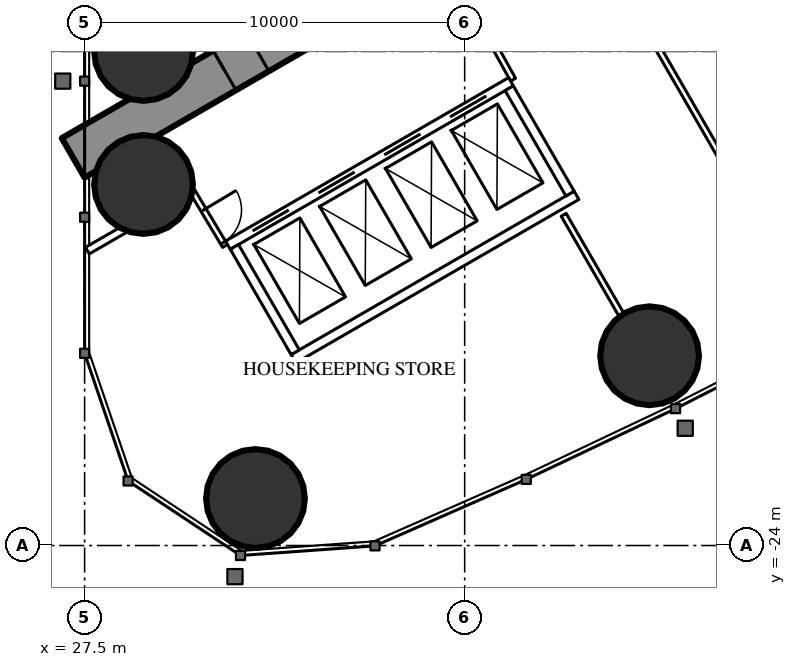
"""IFC4 building model, lengths in metres.
Left out: names, types, materials, properties, quantities, classifications, styles, units other than length and angle.
Written with IfcOpenShell. Run it as: python <this file> out.ifc"""

import sys

from ifc_helpers import new_model, si_unit, direction, frame, frame_2d, origin, origin_2d, place, context, subcontext, project, spatial, rectangle, hollow_circle, extrude, element, fill, save


model = new_model("IFC4")
c1 = context("Model", 3, precision=1e-05, world=origin(), true_north=direction((0.0, 1.0)))
c2 = subcontext(c1, "Body", "Model", "MODEL_VIEW")
j1 = project(units=[si_unit("LENGTHUNIT", "METRE"), si_unit("PLANEANGLEUNIT", "RADIAN")], contexts=[c1])
p1 = place(None, origin())
s1 = spatial("IfcSite", under=j1, at=p1, CompositionType="ELEMENT")
p2 = place(p1, origin())
s2 = spatial("IfcBuilding", under=s1, at=p2, CompositionType="ELEMENT")
p3 = place(p2, frame((0.0, 0.0, 115.1)))
s3 = spatial("IfcBuildingStorey", under=s2, at=p3, CompositionType="ELEMENT", Elevation=115.1)
for number, where, z_axis, x_axis in (
    (1, (31.996, -22.763, 0.0), (0.0, 0.0, 1.0), (1.0, 0.0, 0.0)),
    (2, (29.05, -11.0, 0.0), (0.0, 0.0, 1.0), (1.0, 0.0, 0.0)),
    (3, (29.05, -14.5, 0.0), (0.0, 0.0, 1.0), (1.0, 0.0, 0.0)),
    (4, (42.366, -19.007, 0.0), (0.0, 0.0, 1.0), (1.0, 0.0, 0.0)),
):
    element("IfcColumn", number, at=place(p3, frame(where, z_axis=z_axis, x_axis=x_axis)), inside=s3, PredefinedType="COLUMN", context=c2, shape_type="SweptSolid", body=[
        extrude(hollow_circle(Radius=1.3, WallThickness=0.1, at=origin_2d()), origin(), (0.0, 0.0, 1.0), 3.5),
    ])
p4 = place(p3, frame((27.2, -13.8, 0.0), z_axis=(0.0, 0.0, 1.0), x_axis=(0.866027159892, 0.499996958321, 0.0)))
e5 = element("IfcWall", 5, at=p4, inside=s3, PredefinedType="SHEAR", context=c2, shape_type="SweptSolid", body=[
    extrude(rectangle(XDim=27.947, YDim=1.2, at=frame_2d((13.973, 0.0))), origin(), (0.0, 0.0, 1.0), 3.5),
])
p5 = place(p4, frame((4.6, 0.0, 0.0)))
e6 = element("IfcOpeningElement", 6, at=p5, cuts=e5, PredefinedType="OPENING", context=c2, shape_type="SweptSolid", body=[
    extrude(rectangle(XDim=1.0, YDim=2.2, at=frame_2d((0.5, 1.1))), frame((0.0, 0.61, 0.0), z_axis=(0.0, -1.0, 0.0), x_axis=(1.0, 0.0, 0.0)), (0.0, 0.0, 1.0), 1.22),
])
p6 = place(p4, frame((13.395, 0.0, 0.0)))
e7 = element("IfcOpeningElement", 7, at=p6, cuts=e5, PredefinedType="OPENING", context=c2, shape_type="SweptSolid", body=[
    extrude(rectangle(XDim=1.8, YDim=2.2, at=frame_2d((0.9, 1.1))), frame((0.0, 0.61, 0.0), z_axis=(0.0, -1.0, 0.0), x_axis=(1.0, 0.0, 0.0)), (0.0, 0.0, 1.0), 1.22),
])
p7 = place(p3, frame((41.19, -8.494, 0.0), z_axis=(0.0, 0.0, 1.0), x_axis=(0.49999258054, -0.866029687369, 0.0)))
e8 = element("IfcWall", 8, at=p7, inside=s3, PredefinedType="PARTITIONING", context=c2, shape_type="SweptSolid", body=[
    extrude(rectangle(XDim=11.318, YDim=0.15, at=frame_2d((5.659, 0.0))), origin(), (0.0, 0.0, 1.0), 3.25),
])
p8 = place(p3, frame((40.105, -15.299, 0.0), z_axis=(0.0, 0.0, 1.0), x_axis=(0.499978822259, -0.866037630414, 0.0)))
e9 = element("IfcWall", 9, at=p8, inside=s3, PredefinedType="PARTITIONING", context=c2, shape_type="SweptSolid", body=[
    extrude(rectangle(XDim=3.023, YDim=0.15, at=frame_2d((1.511, 0.0))), origin(), (0.0, 0.0, 1.0), 3.25),
])
p9 = place(p3, frame((27.572, -16.241, 0.0), z_axis=(0.0, 0.0, 1.0), x_axis=(0.866029654818, 0.499992636921, 0.0)))
e10 = element("IfcWall", 10, at=p9, inside=s3, PredefinedType="PARTITIONING", context=c2, shape_type="SweptSolid", body=[
    extrude(rectangle(XDim=3.155, YDim=0.2, at=frame_2d((1.577, 0.0))), origin(), (0.0, 0.0, 1.0), 3.25),
])
p10 = place(p3, frame((30.267, -14.569, 0.0), z_axis=(0.0, 0.0, 1.0), x_axis=(0.514336634837, -0.857588377991, 0.0)))
e11 = element("IfcWall", 11, at=p10, inside=s3, PredefinedType="PARTITIONING", context=c2, shape_type="SweptSolid", body=[
    extrude(rectangle(XDim=1.805, YDim=0.15, at=frame_2d((0.903, 0.0))), origin(), (0.0, 0.0, 1.0), 3.25),
])
p11 = place(p10, frame((0.703, 0.0, 0.0)))
e12 = element("IfcOpeningElement", 12, at=p11, cuts=e11, PredefinedType="OPENING", context=c2, shape_type="SweptSolid", body=[
    extrude(rectangle(XDim=1.0, YDim=2.2, at=frame_2d((0.5, 1.1))), frame((0.0, 0.085, 0.0), z_axis=(0.0, -1.0, 0.0), x_axis=(1.0, 0.0, 0.0)), (0.0, 0.0, 1.0), 0.17),
])
p12 = place(p3, frame((38.773, -11.742, 0.0), z_axis=(0.0, 0.0, 1.0), x_axis=(-0.485528096672, 0.8742210632, 0.0)))
e13 = element("IfcWall", 13, at=p12, inside=s3, PredefinedType="PARTITIONING", context=c2, shape_type="SweptSolid", body=[
    extrude(rectangle(XDim=1.805, YDim=0.15, at=frame_2d((0.903, 0.0))), origin(), (0.0, 0.0, 1.0), 3.25),
])
p13 = place(p3, frame((31.271, -16.097, 0.0), z_axis=(0.0, 0.0, 1.0), x_axis=(0.86604045752, 0.499973925258, 0.0)))
e14 = element("IfcWall", 14, at=p13, inside=s3, PredefinedType="PARTITIONING", context=c2, shape_type="SweptSolid", body=[
    extrude(rectangle(XDim=8.6, YDim=0.25, at=frame_2d((4.3, 0.0))), origin(), (0.0, 0.0, 1.0), 3.25),
])
p14 = place(p13, frame((0.75, 0.0, 0.0)))
e15 = element("IfcOpeningElement", 15, at=p14, cuts=e14, PredefinedType="OPENING", context=c2, shape_type="SweptSolid", body=[
    extrude(rectangle(XDim=1.1, YDim=2.2, at=frame_2d((0.55, 1.1))), frame((0.0, 0.135, 0.0), z_axis=(0.0, -1.0, 0.0), x_axis=(1.0, 0.0, 0.0)), (0.0, 0.0, 1.0), 0.27),
])
p15 = place(p13, frame((2.75, 0.0, 0.0)))
e16 = element("IfcOpeningElement", 16, at=p15, cuts=e14, PredefinedType="OPENING", context=c2, shape_type="SweptSolid", body=[
    extrude(rectangle(XDim=1.1, YDim=2.2, at=frame_2d((0.55, 1.1))), frame((0.0, 0.135, 0.0), z_axis=(0.0, -1.0, 0.0), x_axis=(1.0, 0.0, 0.0)), (0.0, 0.0, 1.0), 0.27),
])
p16 = place(p13, frame((4.75, 0.0, 0.0)))
e17 = element("IfcOpeningElement", 17, at=p16, cuts=e14, PredefinedType="OPENING", context=c2, shape_type="SweptSolid", body=[
    extrude(rectangle(XDim=1.1, YDim=2.2, at=frame_2d((0.55, 1.1))), frame((0.0, 0.135, 0.0), z_axis=(0.0, -1.0, 0.0), x_axis=(1.0, 0.0, 0.0)), (0.0, 0.0, 1.0), 0.27),
])
p17 = place(p13, frame((6.75, 0.0, 0.0)))
e18 = element("IfcOpeningElement", 18, at=p17, cuts=e14, PredefinedType="OPENING", context=c2, shape_type="SweptSolid", body=[
    extrude(rectangle(XDim=1.1, YDim=2.2, at=frame_2d((0.55, 1.1))), frame((0.0, 0.135, 0.0), z_axis=(0.0, -1.0, 0.0), x_axis=(1.0, 0.0, 0.0)), (0.0, 0.0, 1.0), 0.27),
])
p18 = place(p3, frame((32.996, -19.086, 0.0), z_axis=(0.0, 0.0, 1.0), x_axis=(0.866028165386, 0.499995216735, 0.0)))
e19 = element("IfcWall", 19, at=p18, inside=s3, PredefinedType="PARTITIONING", context=c2, shape_type="SweptSolid", body=[
    extrude(rectangle(XDim=8.6, YDim=0.25, at=frame_2d((4.3, 0.0))), origin(), (0.0, 0.0, 1.0), 3.25),
])
for number, where, z_axis, x_axis in (
    (20, (31.441, -16.143, 0.0), (0.0, 0.0, 1.0), (0.5, -0.866, 0.0)),
    (21, (38.673, -11.968, 0.0), (0.0, 0.0, 1.0), (0.5, -0.866, 0.0)),
):
    element("IfcWall", number, at=place(p3, frame(where, z_axis=z_axis, x_axis=x_axis)), inside=s3, PredefinedType="PARTITIONING", context=c2, shape_type="SweptSolid", body=[
        extrude(rectangle(XDim=3.201, YDim=0.25, at=frame_2d((1.6, 0.0))), origin(), (0.0, 0.0, 1.0), 3.25),
    ])
p19 = place(p11, origin())
e22 = element("IfcDoor", 22, at=p19, inside=s3, OperationType="SINGLE_SWING_LEFT", PredefinedType="DOOR", context=c2, shape_type="SweptSolid", body=[
    extrude(rectangle(XDim=1.0, YDim=2.2, at=frame_2d((0.5, 1.1))), frame((0.0, 0.025, 0.0), z_axis=(0.0, -1.0, 0.0), x_axis=(1.0, 0.0, 0.0)), (0.0, 0.0, 1.0), 0.05),
])
fill(e12, e22)
p20 = place(p5, origin())
e23 = element("IfcDoor", 23, at=p20, inside=s3, OperationType="SINGLE_SWING_LEFT", PredefinedType="DOOR", context=c2, shape_type="SweptSolid", body=[
    extrude(rectangle(XDim=1.0, YDim=2.2, at=frame_2d((0.5, 1.1))), frame((0.0, 0.025, 0.0), z_axis=(0.0, -1.0, 0.0), x_axis=(1.0, 0.0, 0.0)), (0.0, 0.0, 1.0), 0.05),
])
fill(e6, e23)
p21 = place(p14, origin())
e24 = element("IfcDoor", 24, at=p21, inside=s3, OperationType="DOUBLE_DOOR_SLIDING", PredefinedType="USERDEFINED", context=c2, shape_type="SweptSolid", body=[
    extrude(rectangle(XDim=1.1, YDim=2.2, at=frame_2d((0.55, 1.1))), frame((0.0, 0.025, 0.0), z_axis=(0.0, -1.0, 0.0), x_axis=(1.0, 0.0, 0.0)), (0.0, 0.0, 1.0), 0.05),
])
fill(e15, e24)
p22 = place(p15, origin())
e25 = element("IfcDoor", 25, at=p22, inside=s3, OperationType="DOUBLE_DOOR_SLIDING", PredefinedType="USERDEFINED", context=c2, shape_type="SweptSolid", body=[
    extrude(rectangle(XDim=1.1, YDim=2.2, at=frame_2d((0.55, 1.1))), frame((0.0, 0.025, 0.0), z_axis=(0.0, -1.0, 0.0), x_axis=(1.0, 0.0, 0.0)), (0.0, 0.0, 1.0), 0.05),
])
fill(e16, e25)
p23 = place(p16, origin())
e26 = element("IfcDoor", 26, at=p23, inside=s3, OperationType="DOUBLE_DOOR_SLIDING", PredefinedType="USERDEFINED", context=c2, shape_type="SweptSolid", body=[
    extrude(rectangle(XDim=1.1, YDim=2.2, at=frame_2d((0.55, 1.1))), frame((0.0, 0.025, 0.0), z_axis=(0.0, -1.0, 0.0), x_axis=(1.0, 0.0, 0.0)), (0.0, 0.0, 1.0), 0.05),
])
fill(e17, e26)
p24 = place(p17, origin())
e27 = element("IfcDoor", 27, at=p24, inside=s3, OperationType="DOUBLE_DOOR_SLIDING", PredefinedType="USERDEFINED", context=c2, shape_type="SweptSolid", body=[
    extrude(rectangle(XDim=1.1, YDim=2.2, at=frame_2d((0.55, 1.1))), frame((0.0, 0.025, 0.0), z_axis=(0.0, -1.0, 0.0), x_axis=(1.0, 0.0, 0.0)), (0.0, 0.0, 1.0), 0.05),
])
fill(e18, e27)
save(model, sys.argv[1])
